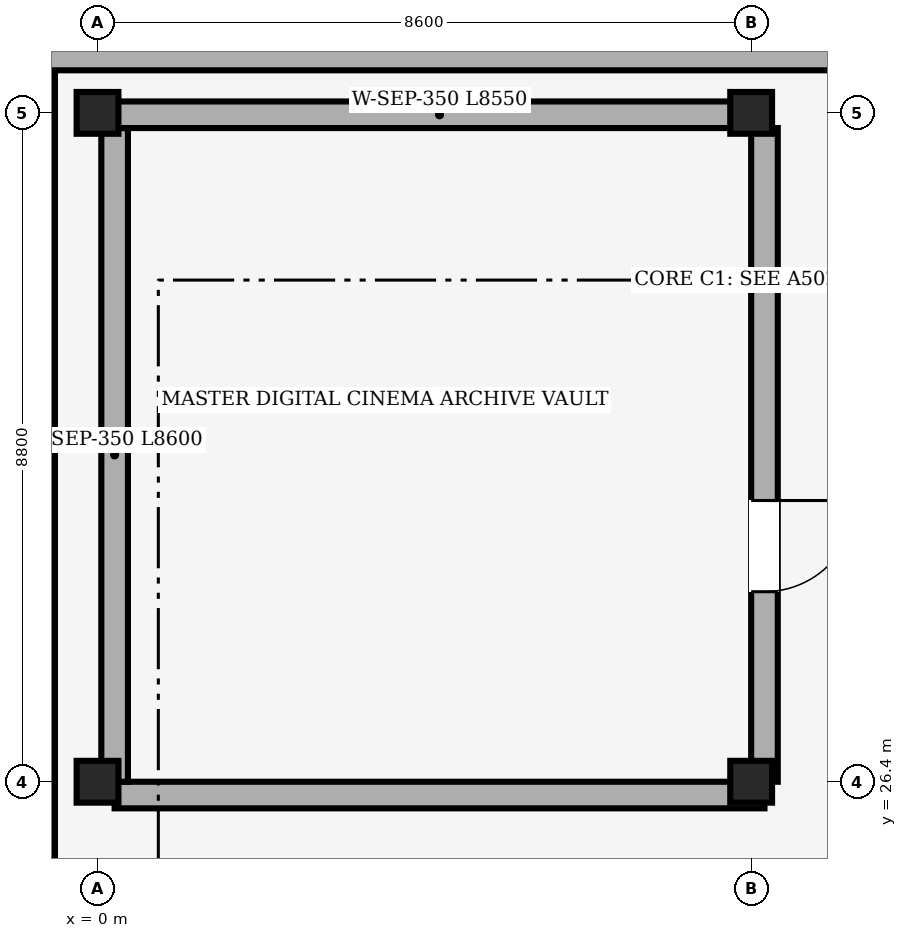
"""IFC4 building model, lengths in metres.
Left out: names, types, materials, properties, quantities, classifications, styles, units other than length and angle.
Written with IfcOpenShell. Run it as: python <this file> out.ifc"""

import sys

from ifc_helpers import new_model, si_unit, direction, frame, frame_2d, origin, origin_2d, place, context, subcontext, project, spatial, rectangle, extrude, element, fill, save


model = new_model("IFC4")
c1 = context("Model", 3, precision=1e-05, world=origin(), true_north=direction((0.0, 1.0)))
c2 = subcontext(c1, "Body", "Model", "MODEL_VIEW")
j1 = project(units=[si_unit("LENGTHUNIT", "METRE"), si_unit("PLANEANGLEUNIT", "RADIAN")], contexts=[c1])
p1 = place(None, origin())
s1 = spatial("IfcSite", under=j1, at=p1, CompositionType="ELEMENT")
p2 = place(p1, origin())
s2 = spatial("IfcBuilding", under=s1, at=p2, CompositionType="ELEMENT")
p3 = place(p2, frame((0.0, 0.0, 25.5)))
s3 = spatial("IfcBuildingStorey", under=s2, at=p3, CompositionType="ELEMENT", Elevation=25.5)
for number, where, z_axis, x_axis in (
    (1, (0.0, 26.4, 0.0), (0.0, 0.0, 1.0), (1.0, 0.0, 0.0)),
    (2, (0.0, 35.2, 0.0), (0.0, 0.0, 1.0), (1.0, 0.0, 0.0)),
    (3, (8.6, 26.4, 0.0), (0.0, 0.0, 1.0), (1.0, 0.0, 0.0)),
    (4, (8.6, 35.2, 0.0), (0.0, 0.0, 1.0), (1.0, 0.0, 0.0)),
):
    element("IfcColumn", number, at=place(p3, frame(where, z_axis=z_axis, x_axis=x_axis)), inside=s3, PredefinedType="COLUMN", context=c2, shape_type="SweptSolid", body=[
        extrude(rectangle(XDim=0.55, YDim=0.55, at=origin_2d()), origin(), (0.0, 0.0, 1.0), 2.91),
    ])
p4 = place(p3, frame((-0.74, -0.74, 0.0), z_axis=(0.0, 0.0, 1.0), x_axis=(0.0, 1.0, 0.0)))
e5 = element("IfcWall", 5, at=p4, inside=s3, PredefinedType="SOLIDWALL", context=c2, shape_type="SweptSolid", body=[
    extrude(rectangle(XDim=36.68, YDim=0.36, at=frame_2d((18.34, 0.0))), origin(), (0.0, 0.0, 1.0), 2.91),
])
p5 = place(p4, frame((16.4, 0.0, 0.36)))
e6 = element("IfcOpeningElement", 6, at=p5, cuts=e5, PredefinedType="OPENING", context=c2, shape_type="SweptSolid", body=[
    extrude(rectangle(XDim=0.28, YDim=0.28, at=frame_2d((0.14, 0.14))), frame((0.0, 0.18, 0.0), z_axis=(0.0, -1.0, 0.0), x_axis=(1.0, 0.0, 0.0)), (0.0, 0.0, 1.0), 0.36),
])
p6 = place(p4, frame((17.3, 0.0, 0.36)))
e7 = element("IfcOpeningElement", 7, at=p6, cuts=e5, PredefinedType="OPENING", context=c2, shape_type="SweptSolid", body=[
    extrude(rectangle(XDim=0.28, YDim=0.28, at=frame_2d((0.14, 0.14))), frame((0.0, 0.18, 0.0), z_axis=(0.0, -1.0, 0.0), x_axis=(1.0, 0.0, 0.0)), (0.0, 0.0, 1.0), 0.36),
])
p7 = place(p4, frame((20.0, 0.0, 0.36)))
e8 = element("IfcOpeningElement", 8, at=p7, cuts=e5, PredefinedType="OPENING", context=c2, shape_type="SweptSolid", body=[
    extrude(rectangle(XDim=0.28, YDim=0.28, at=frame_2d((0.14, 0.14))), frame((0.0, 0.18, 0.0), z_axis=(0.0, -1.0, 0.0), x_axis=(1.0, 0.0, 0.0)), (0.0, 0.0, 1.0), 0.36),
])
p8 = place(p3, frame((-0.74, 35.94, 0.0), z_axis=(0.0, 0.0, 1.0), x_axis=(1.0, 0.0, 0.0)))
e9 = element("IfcWall", 9, at=p8, inside=s3, PredefinedType="SOLIDWALL", context=c2, shape_type="SweptSolid", body=[
    extrude(rectangle(XDim=34.64, YDim=0.36, at=frame_2d((17.32, 0.0))), origin(), (0.0, 0.0, 1.0), 2.91),
])
p9 = place(p8, frame((16.28, 0.0, 0.36)))
e10 = element("IfcOpeningElement", 10, at=p9, cuts=e9, PredefinedType="OPENING", context=c2, shape_type="SweptSolid", body=[
    extrude(rectangle(XDim=0.28, YDim=0.28, at=frame_2d((0.14, 0.14))), frame((0.0, 0.18, 0.0), z_axis=(0.0, -1.0, 0.0), x_axis=(1.0, 0.0, 0.0)), (0.0, 0.0, 1.0), 0.36),
])
p10 = place(p8, frame((17.18, 0.0, 0.36)))
e11 = element("IfcOpeningElement", 11, at=p10, cuts=e9, PredefinedType="OPENING", context=c2, shape_type="SweptSolid", body=[
    extrude(rectangle(XDim=0.28, YDim=0.28, at=frame_2d((0.14, 0.14))), frame((0.0, 0.18, 0.0), z_axis=(0.0, -1.0, 0.0), x_axis=(1.0, 0.0, 0.0)), (0.0, 0.0, 1.0), 0.36),
])
p11 = place(p8, frame((19.88, 0.0, 0.36)))
e12 = element("IfcOpeningElement", 12, at=p11, cuts=e9, PredefinedType="OPENING", context=c2, shape_type="SweptSolid", body=[
    extrude(rectangle(XDim=0.28, YDim=0.28, at=frame_2d((0.14, 0.14))), frame((0.0, 0.18, 0.0), z_axis=(0.0, -1.0, 0.0), x_axis=(1.0, 0.0, 0.0)), (0.0, 0.0, 1.0), 0.36),
])
p12 = place(p3, frame((8.775, 26.225, 0.0), z_axis=(0.0, 0.0, 1.0), x_axis=(-1.0, 0.0, 0.0)))
e13 = element("IfcWall", 13, at=p12, inside=s3, PredefinedType="SOLIDWALL", context=c2, shape_type="SweptSolid", body=[
    extrude(rectangle(XDim=8.55, YDim=0.35, at=frame_2d((4.275, 0.0))), origin(), (0.0, 0.0, 1.0), 2.34),
])
p13 = place(p3, frame((0.225, 26.4, 0.0), z_axis=(0.0, 0.0, 1.0), x_axis=(0.0, 1.0, 0.0)))
e14 = element("IfcWall", 14, at=p13, inside=s3, PredefinedType="SOLIDWALL", context=c2, shape_type="SweptSolid", body=[
    extrude(rectangle(XDim=8.6, YDim=0.35, at=frame_2d((4.3, 0.0))), origin(), (0.0, 0.0, 1.0), 2.3),
])
p14 = place(p3, frame((0.225, 35.175, 0.0), z_axis=(0.0, 0.0, 1.0), x_axis=(1.0, 0.0, 0.0)))
e15 = element("IfcWall", 15, at=p14, inside=s3, PredefinedType="SOLIDWALL", context=c2, shape_type="SweptSolid", body=[
    extrude(rectangle(XDim=8.55, YDim=0.35, at=frame_2d((4.275, 0.0))), origin(), (0.0, 0.0, 1.0), 2.34),
])
p15 = place(p3, frame((8.775, 35.0, 0.0), z_axis=(0.0, 0.0, 1.0), x_axis=(0.0, -1.0, 0.0)))
e16 = element("IfcWall", 16, at=p15, inside=s3, PredefinedType="SOLIDWALL", context=c2, shape_type="SweptSolid", body=[
    extrude(rectangle(XDim=8.6, YDim=0.35, at=frame_2d((4.3, 0.0))), origin(), (0.0, 0.0, 1.0), 2.34),
])
p16 = place(p15, frame((4.9, 0.0, 0.0)))
e17 = element("IfcOpeningElement", 17, at=p16, cuts=e16, PredefinedType="OPENING", context=c2, shape_type="SweptSolid", body=[
    extrude(rectangle(XDim=1.2, YDim=2.15, at=frame_2d((0.6, 1.075))), frame((0.0, 0.175, 0.0), z_axis=(0.0, -1.0, 0.0), x_axis=(1.0, 0.0, 0.0)), (0.0, 0.0, 1.0), 0.35),
])
p17 = place(p16, origin())
e18 = element("IfcDoor", 18, at=p17, inside=s3, OperationType="SINGLE_SWING_LEFT", PredefinedType="DOOR", context=c2, shape_type="SweptSolid", body=[
    extrude(rectangle(XDim=1.2, YDim=2.15, at=frame_2d((0.6, 1.075))), frame((0.0, 0.025, 0.0), z_axis=(0.0, -1.0, 0.0), x_axis=(1.0, 0.0, 0.0)), (0.0, 0.0, 1.0), 0.05),
])
fill(e17, e18)
save(model, sys.argv[1])
